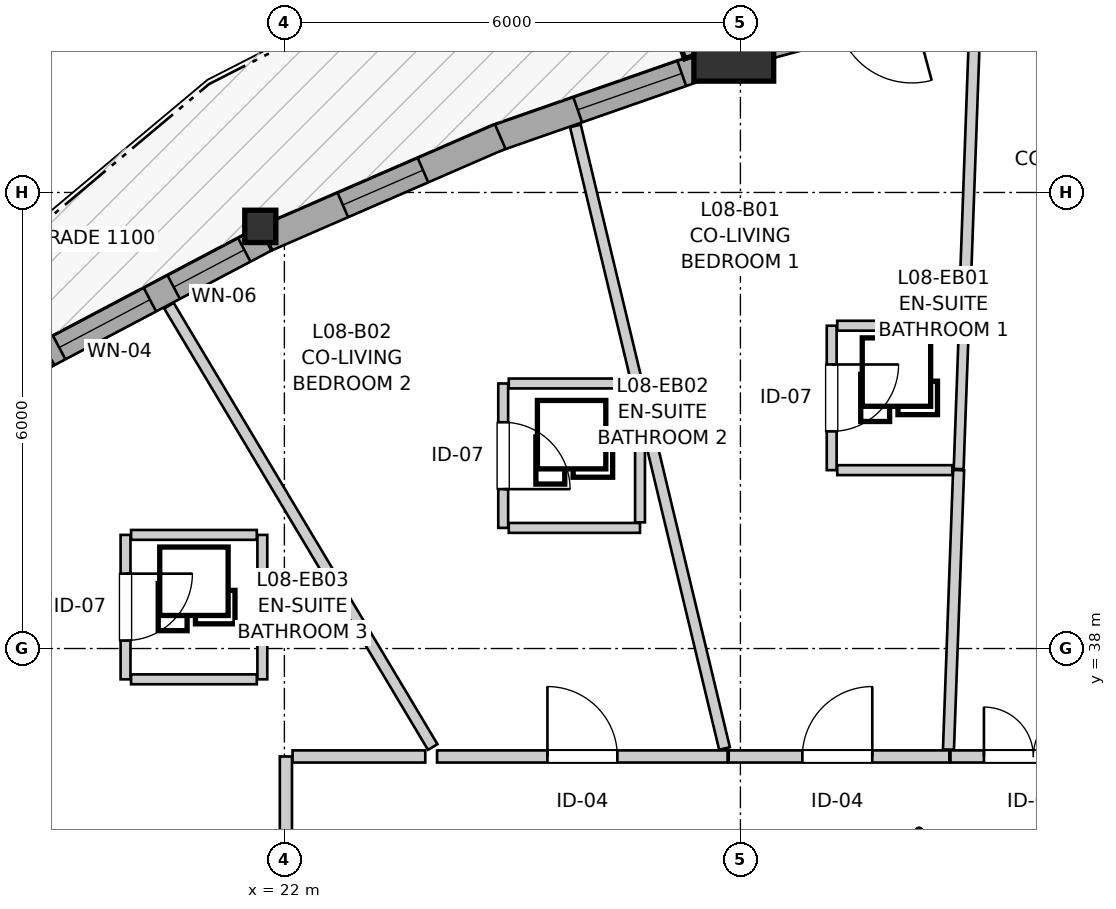
"""IFC4 building model, lengths in metres.
Left out: names, types, materials, properties, quantities, classifications, styles, units other than length and angle.
Written with IfcOpenShell. Run it as: python <this file> out.ifc"""

import sys

from ifc_helpers import new_model, si_unit, direction, frame, frame_2d, origin, origin_2d, place, context, subcontext, project, spatial, rectangle, i_section, extrude, source, transform, mapped, element, fill, save


model = new_model("IFC4")
c1 = context("Model", 3, precision=1e-05, world=origin(), true_north=direction((0.0, 1.0)))
c2 = subcontext(c1, "Body", "Model", "MODEL_VIEW")
j1 = project(units=[si_unit("LENGTHUNIT", "METRE"), si_unit("PLANEANGLEUNIT", "RADIAN")], contexts=[c1])
p1 = place(None, origin())
s1 = spatial("IfcSite", under=j1, at=p1, CompositionType="ELEMENT")
p2 = place(p1, origin())
s2 = spatial("IfcBuilding", under=s1, at=p2, CompositionType="ELEMENT")
p3 = place(p2, frame((0.0, 0.0, 30.2)))
s3 = spatial("IfcBuildingStorey", under=s2, at=p3, CompositionType="ELEMENT", Elevation=30.2)
m1 = source(origin(), c2, "Body", "SweptSolid", [
    extrude(rectangle(XDim=1.05, YDim=1.05, at=origin_2d()), origin(), (0.0, 0.0, 1.0), 2.935),
])
p4 = place(p3, frame((27.913, 45.99, 0.0), z_axis=(0.0, 0.0, 1.0), x_axis=(1.0, 0.0, 0.0)))
e1 = element("IfcColumn", 1, at=p4, inside=s3, PredefinedType="COLUMN", context=c2, shape_type="MappedRepresentation", body=[
    mapped(m1, transform((0.0, 0.0, 0.0), x_axis=(1.0, 0.0, 0.0), y_axis=(0.0, 1.0, 0.0), z_axis=(0.0, 0.0, 1.0), scale=1.0)),
])
m2 = source(origin(), c2, "Body", "SweptSolid", [
    extrude(i_section(OverallWidth=0.409, OverallDepth=0.425, WebThickness=0.03, FlangeThickness=0.048, FilletRadius=0.015, at=origin_2d()), origin(), (0.0, 0.0, 1.0), 2.935),
])
p5 = place(p3, frame((21.683, 43.554, 0.0), z_axis=(0.0, 0.0, 1.0), x_axis=(1.0, 0.0, 0.0)))
e2 = element("IfcColumn", 2, at=p5, inside=s3, PredefinedType="PILASTER", context=c2, shape_type="MappedRepresentation", body=[
    mapped(m2, transform((0.0, 0.0, 0.0), x_axis=(1.0, 0.0, 0.0), y_axis=(0.0, 1.0, 0.0), z_axis=(0.0, 0.0, 1.0), scale=1.0)),
])
p6 = place(p3, frame((31.298, 46.722, 0.0), z_axis=(0.0, 0.0, 1.0), x_axis=(-0.965455913242, -0.260566459057, 0.0)))
e3 = element("IfcWall", 3, at=p6, inside=s3, PredefinedType="SOLIDWALL", context=c2, shape_type="SweptSolid", body=[
    extrude(rectangle(XDim=3.159, YDim=0.35, at=frame_2d((1.58, 0.0))), origin(), (0.0, 0.0, 1.0), 2.415),
])
p7 = place(p6, frame((1.08, 0.0, 0.0)))
e4 = element("IfcOpeningElement", 4, at=p7, cuts=e3, PredefinedType="OPENING", context=c2, shape_type="SweptSolid", body=[
    extrude(rectangle(XDim=1.0, YDim=2.1, at=frame_2d((0.5, 1.05))), frame((0.0, 0.185, 0.0), z_axis=(0.0, -1.0, 0.0), x_axis=(1.0, 0.0, 0.0)), (0.0, 0.0, 1.0), 0.37),
])
p8 = place(p3, frame((27.687, 45.726, 0.0), z_axis=(0.0, 0.0, 1.0), x_axis=(-0.9441205041, -0.329600475936, 0.0)))
e5 = element("IfcWall", 5, at=p8, inside=s3, PredefinedType="SOLIDWALL", context=c2, shape_type="SweptSolid", body=[
    extrude(rectangle(XDim=3.104, YDim=0.35, at=frame_2d((1.552, 0.0))), origin(), (0.0, 0.0, 1.0), 2.415),
])
p9 = place(p8, frame((0.486, 0.0, 0.82)))
e6 = element("IfcOpeningElement", 6, at=p9, cuts=e5, PredefinedType="OPENING", context=c2, shape_type="SweptSolid", body=[
    extrude(rectangle(XDim=1.45, YDim=1.25, at=frame_2d((0.725, 0.625))), frame((0.0, 0.185, 0.0), z_axis=(0.0, -1.0, 0.0), x_axis=(1.0, 0.0, 0.0)), (0.0, 0.0, 1.0), 0.37),
])
p10 = place(p3, frame((24.84, 44.735, 0.0), z_axis=(0.0, 0.0, 1.0), x_axis=(-0.917090935142, -0.398678086532, 0.0)))
e7 = element("IfcWall", 7, at=p10, inside=s3, PredefinedType="SOLIDWALL", context=c2, shape_type="SweptSolid", body=[
    extrude(rectangle(XDim=3.346, YDim=0.35, at=frame_2d((1.673, 0.0))), origin(), (0.0, 0.0, 1.0), 2.415),
])
p11 = place(p10, frame((1.108, 0.0, 0.82)))
e8 = element("IfcOpeningElement", 8, at=p11, cuts=e7, PredefinedType="OPENING", context=c2, shape_type="SweptSolid", body=[
    extrude(rectangle(XDim=1.15, YDim=1.2, at=frame_2d((0.575, 0.6))), frame((0.0, 0.185, 0.0), z_axis=(0.0, -1.0, 0.0), x_axis=(1.0, 0.0, 0.0)), (0.0, 0.0, 1.0), 0.37),
])
p12 = place(p3, frame((21.747, 43.39, 0.0), z_axis=(0.0, 0.0, 1.0), x_axis=(-0.88437802144, -0.46677137358, 0.0)))
e9 = element("IfcWall", 9, at=p12, inside=s3, PredefinedType="SOLIDWALL", context=c2, shape_type="SweptSolid", body=[
    extrude(rectangle(XDim=3.327, YDim=0.35, at=frame_2d((1.664, 0.0))), origin(), (0.0, 0.0, 1.0), 2.415),
])
p13 = place(p12, frame((0.311, 0.0, 0.82)))
e10 = element("IfcOpeningElement", 10, at=p13, cuts=e9, PredefinedType="OPENING", context=c2, shape_type="SweptSolid", body=[
    extrude(rectangle(XDim=1.05, YDim=1.45, at=frame_2d((0.525, 0.725))), frame((0.0, 0.185, 0.0), z_axis=(0.0, -1.0, 0.0), x_axis=(1.0, 0.0, 0.0)), (0.0, 0.0, 1.0), 0.37),
])
p14 = place(p12, frame((1.714, 0.0, 0.82)))
e11 = element("IfcOpeningElement", 11, at=p14, cuts=e9, PredefinedType="OPENING", context=c2, shape_type="SweptSolid", body=[
    extrude(rectangle(XDim=1.35, YDim=1.45, at=frame_2d((0.675, 0.725))), frame((0.0, 0.185, 0.0), z_axis=(0.0, -1.0, 0.0), x_axis=(1.0, 0.0, 0.0)), (0.0, 0.0, 1.0), 0.37),
])
p15 = place(p3, frame((18.882, 41.882, 0.0), z_axis=(0.0, 0.0, 1.0), x_axis=(-0.846428134238, -0.53250297048, 0.0)))
e12 = element("IfcWall", 12, at=p15, inside=s3, PredefinedType="SOLIDWALL", context=c2, shape_type="SweptSolid", body=[
    extrude(rectangle(XDim=3.047, YDim=0.35, at=frame_2d((1.523, 0.0))), origin(), (0.0, 0.0, 1.0), 2.415),
])
p16 = place(p15, frame((0.803, 0.0, 0.82)))
e13 = element("IfcOpeningElement", 13, at=p16, cuts=e12, PredefinedType="OPENING", context=c2, shape_type="SweptSolid", body=[
    extrude(rectangle(XDim=1.45, YDim=1.25, at=frame_2d((0.725, 0.625))), frame((0.0, 0.185, 0.0), z_axis=(0.0, -1.0, 0.0), x_axis=(1.0, 0.0, 0.0)), (0.0, 0.0, 1.0), 0.37),
])
p17 = place(p3, frame((22.02, 32.71, 0.0), z_axis=(0.0, 0.0, 1.0), x_axis=(0.0, 1.0, 0.0)))
e14 = element("IfcWall", 14, at=p17, inside=s3, PredefinedType="PARTITIONING", context=c2, shape_type="SweptSolid", body=[
    extrude(rectangle(XDim=3.87, YDim=0.16, at=frame_2d((1.935, 0.0))), origin(), (0.0, 0.0, 1.0), 2.935),
])
p18 = place(p17, frame((1.485, 0.0, 0.0)))
e15 = element("IfcOpeningElement", 15, at=p18, cuts=e14, PredefinedType="OPENING", context=c2, shape_type="SweptSolid", body=[
    extrude(rectangle(XDim=0.92, YDim=2.1, at=frame_2d((0.46, 1.05))), frame((0.0, 0.09, 0.0), z_axis=(0.0, -1.0, 0.0), x_axis=(1.0, 0.0, 0.0)), (0.0, 0.0, 1.0), 0.18),
])
p19 = place(p3, frame((24.009, 36.58, 0.0), z_axis=(0.0, 0.0, 1.0), x_axis=(1.0, 0.0, 0.0)))
e16 = element("IfcWall", 16, at=p19, inside=s3, PredefinedType="PARTITIONING", context=c2, shape_type="SweptSolid", body=[
    extrude(rectangle(XDim=3.822, YDim=0.16, at=frame_2d((1.911, 0.0))), origin(), (0.0, 0.0, 1.0), 2.543),
])
p20 = place(p19, frame((1.452, 0.0, 0.0)))
e17 = element("IfcOpeningElement", 17, at=p20, cuts=e16, PredefinedType="OPENING", context=c2, shape_type="SweptSolid", body=[
    extrude(rectangle(XDim=0.92, YDim=2.1, at=frame_2d((0.46, 1.05))), frame((0.0, 0.09, 0.0), z_axis=(0.0, -1.0, 0.0), x_axis=(1.0, 0.0, 0.0)), (0.0, 0.0, 1.0), 0.18),
])
p21 = place(p3, frame((27.846, 36.58, 0.0), z_axis=(0.0, 0.0, 1.0), x_axis=(1.0, 0.0, 0.0)))
e18 = element("IfcWall", 18, at=p21, inside=s3, PredefinedType="PARTITIONING", context=c2, shape_type="SweptSolid", body=[
    extrude(rectangle(XDim=2.903, YDim=0.16, at=frame_2d((1.452, 0.0))), origin(), (0.0, 0.0, 1.0), 2.935),
])
p22 = place(p21, frame((0.969, 0.0, 0.0)))
e19 = element("IfcOpeningElement", 19, at=p22, cuts=e18, PredefinedType="OPENING", context=c2, shape_type="SweptSolid", body=[
    extrude(rectangle(XDim=0.92, YDim=2.1, at=frame_2d((0.46, 1.05))), frame((0.0, 0.09, 0.0), z_axis=(0.0, -1.0, 0.0), x_axis=(1.0, 0.0, 0.0)), (0.0, 0.0, 1.0), 0.18),
])
p23 = place(p3, frame((30.764, 36.58, 0.0), z_axis=(0.0, 0.0, 1.0), x_axis=(1.0, 0.0, 0.0)))
e20 = element("IfcWall", 20, at=p23, inside=s3, PredefinedType="PARTITIONING", context=c2, shape_type="SweptSolid", body=[
    extrude(rectangle(XDim=2.225, YDim=0.16, at=frame_2d((1.113, 0.0))), origin(), (0.0, 0.0, 1.0), 2.935),
])
p24 = place(p23, frame((0.44, 0.0, 0.0)))
e21 = element("IfcOpeningElement", 21, at=p24, cuts=e20, PredefinedType="OPENING", context=c2, shape_type="SweptSolid", body=[
    extrude(rectangle(XDim=1.3, YDim=2.1, at=frame_2d((0.65, 1.05))), frame((0.0, 0.09, 0.0), z_axis=(0.0, -1.0, 0.0), x_axis=(1.0, 0.0, 0.0)), (0.0, 0.0, 1.0), 0.18),
])
p25 = place(p3, frame((29.201, 42.247, 0.0), z_axis=(0.0, 0.0, 1.0), x_axis=(0.0, -1.0, 0.0)))
e22 = element("IfcWall", 22, at=p25, inside=s3, PredefinedType="PARTITIONING", context=c2, shape_type="SweptSolid", body=[
    extrude(rectangle(XDim=1.9, YDim=0.13, at=frame_2d((0.95, 0.0))), origin(), (0.0, 0.0, 1.0), 2.935),
])
p26 = place(p25, frame((0.51, 0.0, 0.0)))
e23 = element("IfcOpeningElement", 23, at=p26, cuts=e22, PredefinedType="OPENING", context=c2, shape_type="SweptSolid", body=[
    extrude(rectangle(XDim=0.88, YDim=2.05, at=frame_2d((0.44, 1.025))), frame((0.0, 0.075, 0.0), z_axis=(0.0, -1.0, 0.0), x_axis=(1.0, 0.0, 0.0)), (0.0, 0.0, 1.0), 0.15),
])
p27 = place(p3, frame((24.879, 41.487, 0.0), z_axis=(0.0, 0.0, 1.0), x_axis=(0.0, -1.0, 0.0)))
e24 = element("IfcWall", 24, at=p27, inside=s3, PredefinedType="PARTITIONING", context=c2, shape_type="SweptSolid", body=[
    extrude(rectangle(XDim=1.9, YDim=0.13, at=frame_2d((0.95, 0.0))), origin(), (0.0, 0.0, 1.0), 2.935),
])
p28 = place(p27, frame((0.51, 0.0, 0.0)))
e25 = element("IfcOpeningElement", 25, at=p28, cuts=e24, PredefinedType="OPENING", context=c2, shape_type="SweptSolid", body=[
    extrude(rectangle(XDim=0.88, YDim=2.05, at=frame_2d((0.44, 1.025))), frame((0.0, 0.075, 0.0), z_axis=(0.0, -1.0, 0.0), x_axis=(1.0, 0.0, 0.0)), (0.0, 0.0, 1.0), 0.15),
])
p29 = place(p3, frame((19.91, 39.495, 0.0), z_axis=(0.0, 0.0, 1.0), x_axis=(0.0, -1.0, 0.0)))
e26 = element("IfcWall", 26, at=p29, inside=s3, PredefinedType="PARTITIONING", context=c2, shape_type="SweptSolid", body=[
    extrude(rectangle(XDim=1.9, YDim=0.13, at=frame_2d((0.95, 0.0))), origin(), (0.0, 0.0, 1.0), 2.935),
])
p30 = place(p29, frame((0.51, 0.0, 0.0)))
e27 = element("IfcOpeningElement", 27, at=p30, cuts=e26, PredefinedType="OPENING", context=c2, shape_type="SweptSolid", body=[
    extrude(rectangle(XDim=0.88, YDim=2.05, at=frame_2d((0.44, 1.025))), frame((0.0, 0.075, 0.0), z_axis=(0.0, -1.0, 0.0), x_axis=(1.0, 0.0, 0.0)), (0.0, 0.0, 1.0), 0.15),
])
p31 = place(p3, frame((11.92, 36.618, 0.0), z_axis=(0.0, 0.0, 1.0), x_axis=(0.866473494239, -0.499223080177, 0.0)))
e28 = element("IfcWall", 28, at=p31, inside=s3, PredefinedType="PARTITIONING", context=c2, shape_type="SweptSolid", body=[
    extrude(rectangle(XDim=11.514, YDim=0.145, at=frame_2d((5.757, 0.0))), origin(), (0.0, 0.0, 1.0), 2.935),
])
p32 = place(p3, frame((14.566, 38.751, 0.0), z_axis=(0.0, 0.0, 1.0), x_axis=(0.777881688073, -0.628410756879, 0.0)))
e29 = element("IfcWall", 29, at=p32, inside=s3, PredefinedType="PARTITIONING", context=c2, shape_type="SweptSolid", body=[
    extrude(rectangle(XDim=9.413, YDim=0.145, at=frame_2d((4.707, 0.0))), origin(), (0.0, 0.0, 1.0), 2.935),
])
p33 = place(p3, frame((20.481, 42.51, 0.0), z_axis=(0.0, 0.0, 1.0), x_axis=(0.513067331262, -0.858348363773, 0.0)))
e30 = element("IfcWall", 30, at=p33, inside=s3, PredefinedType="PARTITIONING", context=c2, shape_type="SweptSolid", body=[
    extrude(rectangle(XDim=6.765, YDim=0.145, at=frame_2d((3.382, 0.0))), origin(), (0.0, 0.0, 1.0), 2.935),
])
p34 = place(p3, frame((26.664, 41.388, 0.0), z_axis=(0.0, 0.0, 1.0), x_axis=(0.233021630241, -0.972471552201, 0.0)))
e31 = element("IfcWall", 31, at=p34, inside=s3, PredefinedType="PARTITIONING", context=c2, shape_type="SweptSolid", body=[
    extrude(rectangle(XDim=4.836, YDim=0.145, at=frame_2d((2.418, 0.0))), origin(), (0.0, 0.0, 1.0), 2.935),
])
p35 = place(p3, frame((30.94, 42.247, 0.0), z_axis=(0.0, 0.0, 1.0), x_axis=(0.03624948077, 0.999342771597, 0.0)))
e32 = element("IfcWall", 32, at=p35, inside=s3, PredefinedType="PARTITIONING", context=c2, shape_type="SweptSolid", body=[
    extrude(rectangle(XDim=4.229, YDim=0.145, at=frame_2d((2.115, 0.0))), origin(), (0.0, 0.0, 1.0), 2.935),
])
p36 = place(p3, frame((30.737, 36.671, 0.0), z_axis=(0.0, 0.0, 1.0), x_axis=(0.036368539535, 0.999338445839, 0.0)))
e33 = element("IfcWall", 33, at=p36, inside=s3, PredefinedType="PARTITIONING", context=c2, shape_type="SweptSolid", body=[
    extrude(rectangle(XDim=3.679, YDim=0.145, at=frame_2d((1.839, 0.0))), origin(), (0.0, 0.0, 1.0), 2.935),
])
p37 = place(p3, frame((25.829, 44.875, 0.0), z_axis=(0.0, 0.0, 1.0), x_axis=(0.232921769711, -0.972495475154, 0.0)))
e34 = element("IfcWall", 34, at=p37, inside=s3, PredefinedType="PARTITIONING", context=c2, shape_type="SweptSolid", body=[
    extrude(rectangle(XDim=3.5, YDim=0.145, at=frame_2d((1.75, 0.0))), origin(), (0.0, 0.0, 1.0), 2.935),
])
p38 = place(p3, frame((22.108, 36.58, 0.0), z_axis=(0.0, 0.0, 1.0), x_axis=(1.0, 0.0, 0.0)))
e35 = element("IfcWall", 35, at=p38, inside=s3, PredefinedType="PARTITIONING", context=c2, shape_type="SweptSolid", body=[
    extrude(rectangle(XDim=1.746, YDim=0.16, at=frame_2d((0.873, 0.0))), origin(), (0.0, 0.0, 1.0), 2.543),
])
p39 = place(p3, frame((21.71, 37.595, 0.0), z_axis=(0.0, 0.0, 1.0), x_axis=(0.0, 1.0, 0.0)))
e36 = element("IfcWall", 36, at=p39, inside=s3, PredefinedType="PARTITIONING", context=c2, shape_type="SweptSolid", body=[
    extrude(rectangle(XDim=1.9, YDim=0.13, at=frame_2d((0.95, 0.0))), origin(), (0.0, 0.0, 1.0), 2.935),
])
p40 = place(p3, frame((30.872, 40.362, 0.0), z_axis=(0.0, 0.0, 1.0), x_axis=(0.036273279858, 0.999341908042, 0.0)))
e37 = element("IfcWall", 37, at=p40, inside=s3, PredefinedType="PARTITIONING", context=c2, shape_type="SweptSolid", body=[
    extrude(rectangle(XDim=1.871, YDim=0.13, at=frame_2d((0.936, 0.0))), origin(), (0.0, 0.0, 1.0), 2.935),
])
for number, where, z_axis, x_axis in (
    (38, (19.983, 39.495, 0.0), (0.0, 0.0, 1.0), (1.0, 0.0, 0.0)),
    (39, (19.983, 37.595, 0.0), (0.0, 0.0, 1.0), (1.0, 0.0, 0.0)),
):
    element("IfcWall", number, at=place(p3, frame(where, z_axis=z_axis, x_axis=x_axis)), inside=s3, PredefinedType="PARTITIONING", context=c2, shape_type="SweptSolid", body=[
        extrude(rectangle(XDim=1.654, YDim=0.13, at=frame_2d((0.827, 0.0))), origin(), (0.0, 0.0, 1.0), 2.935),
    ])
p41 = place(p3, frame((24.952, 39.587, 0.0), z_axis=(0.0, 0.0, 1.0), x_axis=(1.0, 0.0, 0.0)))
e40 = element("IfcWall", 40, at=p41, inside=s3, PredefinedType="PARTITIONING", context=c2, shape_type="SweptSolid", body=[
    extrude(rectangle(XDim=1.727, YDim=0.13, at=frame_2d((0.864, 0.0))), origin(), (0.0, 0.0, 1.0), 2.935),
])
p42 = place(p3, frame((24.952, 41.487, 0.0), z_axis=(0.0, 0.0, 1.0), x_axis=(1.0, 0.0, 0.0)))
e41 = element("IfcWall", 41, at=p42, inside=s3, PredefinedType="PARTITIONING", context=c2, shape_type="SweptSolid", body=[
    extrude(rectangle(XDim=1.59, YDim=0.13, at=frame_2d((0.795, 0.0))), origin(), (0.0, 0.0, 1.0), 2.503),
])
p43 = place(p3, frame((29.274, 42.247, 0.0), z_axis=(0.0, 0.0, 1.0), x_axis=(1.0, 0.0, 0.0)))
e42 = element("IfcWall", 42, at=p43, inside=s3, PredefinedType="PARTITIONING", context=c2, shape_type="SweptSolid", body=[
    extrude(rectangle(XDim=1.583, YDim=0.13, at=frame_2d((0.792, 0.0))), origin(), (0.0, 0.0, 1.0), 2.503),
])
p44 = place(p3, frame((26.679, 39.66, 0.0), z_axis=(0.0, 0.0, 1.0), x_axis=(0.0, 1.0, 0.0)))
e43 = element("IfcWall", 43, at=p44, inside=s3, PredefinedType="PARTITIONING", context=c2, shape_type="SweptSolid", body=[
    extrude(rectangle(XDim=1.38, YDim=0.13, at=frame_2d((0.69, 0.0))), origin(), (0.0, 0.0, 1.0), 2.935),
])
p45 = place(p3, frame((29.274, 40.347, 0.0), z_axis=(0.0, 0.0, 1.0), x_axis=(1.0, 0.0, 0.0)))
e44 = element("IfcWall", 44, at=p45, inside=s3, PredefinedType="PARTITIONING", context=c2, shape_type="SweptSolid", body=[
    extrude(rectangle(XDim=1.514, YDim=0.13, at=frame_2d((0.757, 0.0))), origin(), (0.0, 0.0, 1.0), 2.935),
])
m3 = source(origin(), c2, "Body", "SweptSolid", [
    extrude(rectangle(XDim=1.45, YDim=1.25, at=frame_2d((0.725, 0.625))), frame((0.0, 0.03, 0.0), z_axis=(0.0, -1.0, 0.0), x_axis=(1.0, 0.0, 0.0)), (0.0, 0.0, 1.0), 0.06),
])
p46 = place(p9, origin())
e45 = element("IfcWindow", 45, at=p46, inside=s3, PartitioningType="SINGLE_PANEL", PredefinedType="WINDOW", context=c2, shape_type="MappedRepresentation", body=[
    mapped(m3, transform((0.0, 0.0, 0.0), x_axis=(1.0, 0.0, 0.0), y_axis=(0.0, 1.0, 0.0), z_axis=(0.0, 0.0, 1.0), scale=1.0)),
])
fill(e6, e45)
m4 = source(origin(), c2, "Body", "SweptSolid", [
    extrude(rectangle(XDim=1.15, YDim=1.2, at=frame_2d((0.575, 0.6))), frame((0.0, 0.03, 0.0), z_axis=(0.0, -1.0, 0.0), x_axis=(1.0, 0.0, 0.0)), (0.0, 0.0, 1.0), 0.06),
])
p47 = place(p11, origin())
e46 = element("IfcWindow", 46, at=p47, inside=s3, PartitioningType="SINGLE_PANEL", PredefinedType="WINDOW", context=c2, shape_type="MappedRepresentation", body=[
    mapped(m4, transform((0.0, 0.0, 0.0), x_axis=(1.0, 0.0, 0.0), y_axis=(0.0, 1.0, 0.0), z_axis=(0.0, 0.0, 1.0), scale=1.0)),
])
fill(e8, e46)
m5 = source(origin(), c2, "Body", "SweptSolid", [
    extrude(rectangle(XDim=1.05, YDim=1.45, at=frame_2d((0.525, 0.725))), frame((0.0, 0.03, 0.0), z_axis=(0.0, -1.0, 0.0), x_axis=(1.0, 0.0, 0.0)), (0.0, 0.0, 1.0), 0.06),
])
p48 = place(p13, origin())
e47 = element("IfcWindow", 47, at=p48, inside=s3, PartitioningType="SINGLE_PANEL", PredefinedType="WINDOW", context=c2, shape_type="MappedRepresentation", body=[
    mapped(m5, transform((0.0, 0.0, 0.0), x_axis=(1.0, 0.0, 0.0), y_axis=(0.0, 1.0, 0.0), z_axis=(0.0, 0.0, 1.0), scale=1.0)),
])
fill(e10, e47)
m6 = source(origin(), c2, "Body", "SweptSolid", [
    extrude(rectangle(XDim=1.35, YDim=1.45, at=frame_2d((0.675, 0.725))), frame((0.0, 0.03, 0.0), z_axis=(0.0, -1.0, 0.0), x_axis=(1.0, 0.0, 0.0)), (0.0, 0.0, 1.0), 0.06),
])
p49 = place(p14, origin())
e48 = element("IfcWindow", 48, at=p49, inside=s3, PartitioningType="SINGLE_PANEL", PredefinedType="WINDOW", context=c2, shape_type="MappedRepresentation", body=[
    mapped(m6, transform((0.0, 0.0, 0.0), x_axis=(1.0, 0.0, 0.0), y_axis=(0.0, 1.0, 0.0), z_axis=(0.0, 0.0, 1.0), scale=1.0)),
])
fill(e11, e48)
m7 = source(origin(), c2, "Body", "SweptSolid", [
    extrude(rectangle(XDim=0.92, YDim=2.1, at=frame_2d((0.46, 1.05))), frame((0.0, 0.025, 0.0), z_axis=(0.0, -1.0, 0.0), x_axis=(1.0, 0.0, 0.0)), (0.0, 0.0, 1.0), 0.05),
])
p50 = place(p20, origin())
e49 = element("IfcDoor", 49, at=p50, inside=s3, OperationType="SINGLE_SWING_LEFT", PredefinedType="DOOR", context=c2, shape_type="MappedRepresentation", body=[
    mapped(m7, transform((0.0, 0.0, 0.0), x_axis=(1.0, 0.0, 0.0), y_axis=(0.0, 1.0, 0.0), z_axis=(0.0, 0.0, 1.0), scale=1.0)),
])
fill(e17, e49)
p51 = place(p22, origin())
e50 = element("IfcDoor", 50, at=p51, inside=s3, OperationType="SINGLE_SWING_RIGHT", PredefinedType="DOOR", context=c2, shape_type="MappedRepresentation", body=[
    mapped(m7, transform((0.0, 0.0, 0.0), x_axis=(1.0, 0.0, 0.0), y_axis=(0.0, 1.0, 0.0), z_axis=(0.0, 0.0, 1.0), scale=1.0)),
])
fill(e19, e50)
m8 = source(origin(), c2, "Body", "SweptSolid", [
    extrude(rectangle(XDim=1.3, YDim=2.1, at=frame_2d((0.65, 1.05))), frame((0.0, 0.025, 0.0), z_axis=(0.0, -1.0, 0.0), x_axis=(1.0, 0.0, 0.0)), (0.0, 0.0, 1.0), 0.05),
])
p52 = place(p24, origin())
e51 = element("IfcDoor", 51, at=p52, inside=s3, OperationType="DOUBLE_DOOR_SINGLE_SWING", PredefinedType="DOOR", context=c2, shape_type="MappedRepresentation", body=[
    mapped(m8, transform((0.0, 0.0, 0.0), x_axis=(1.0, 0.0, 0.0), y_axis=(0.0, 1.0, 0.0), z_axis=(0.0, 0.0, 1.0), scale=1.0)),
])
fill(e21, e51)
m9 = source(origin(), c2, "Body", "SweptSolid", [
    extrude(rectangle(XDim=0.88, YDim=2.05, at=frame_2d((0.44, 1.025))), frame((0.0, 0.025, 0.0), z_axis=(0.0, -1.0, 0.0), x_axis=(1.0, 0.0, 0.0)), (0.0, 0.0, 1.0), 0.05),
])
p53 = place(p26, origin())
e52 = element("IfcDoor", 52, at=p53, inside=s3, OperationType="SINGLE_SWING_LEFT", PredefinedType="DOOR", context=c2, shape_type="MappedRepresentation", body=[
    mapped(m9, transform((0.0, 0.0, 0.0), x_axis=(1.0, 0.0, 0.0), y_axis=(0.0, 1.0, 0.0), z_axis=(0.0, 0.0, 1.0), scale=1.0)),
])
fill(e23, e52)
p54 = place(p28, origin())
e53 = element("IfcDoor", 53, at=p54, inside=s3, OperationType="SINGLE_SWING_RIGHT", PredefinedType="DOOR", context=c2, shape_type="MappedRepresentation", body=[
    mapped(m9, transform((0.0, 0.0, 0.0), x_axis=(1.0, 0.0, 0.0), y_axis=(0.0, 1.0, 0.0), z_axis=(0.0, 0.0, 1.0), scale=1.0)),
])
fill(e25, e53)
p55 = place(p30, origin())
e54 = element("IfcDoor", 54, at=p55, inside=s3, OperationType="SINGLE_SWING_LEFT", PredefinedType="DOOR", context=c2, shape_type="MappedRepresentation", body=[
    mapped(m9, transform((0.0, 0.0, 0.0), x_axis=(1.0, 0.0, 0.0), y_axis=(0.0, 1.0, 0.0), z_axis=(0.0, 0.0, 1.0), scale=1.0)),
])
fill(e27, e54)
save(model, sys.argv[1])
